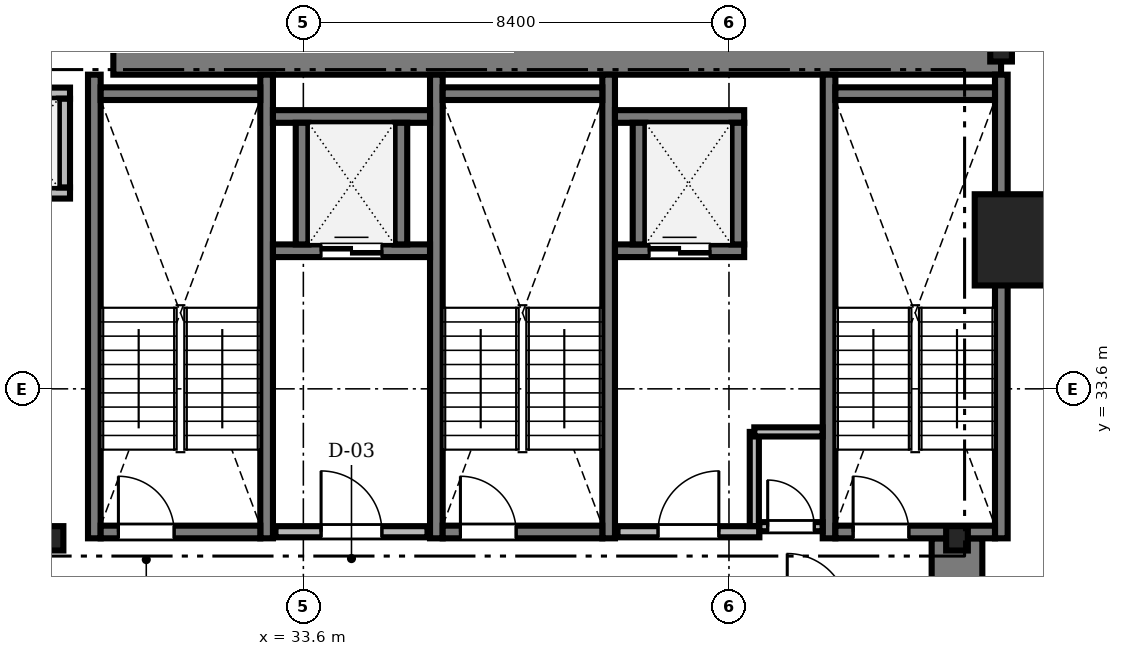
"""IFC4 building model, lengths in metres.
Left out: names, types, materials, properties, quantities, classifications, styles, units other than length and angle.
Written with IfcOpenShell. Run it as: python <this file> out.ifc"""

import sys

from ifc_helpers import new_model, si_unit, direction, frame, frame_2d, origin, origin_2d, place, context, subcontext, project, spatial, rectangle, i_section, extrude, source, transform, mapped, element, fill, save


model = new_model("IFC4")
c1 = context("Model", 3, precision=1e-05, world=origin(), true_north=direction((0.0, 1.0)))
c2 = subcontext(c1, "Body", "Model", "MODEL_VIEW")
j1 = project(units=[si_unit("LENGTHUNIT", "METRE"), si_unit("PLANEANGLEUNIT", "RADIAN")], contexts=[c1])
p1 = place(None, origin())
s1 = spatial("IfcSite", under=j1, at=p1, CompositionType="ELEMENT")
p2 = place(p1, origin())
s2 = spatial("IfcBuilding", under=s1, at=p2, CompositionType="ELEMENT")
p3 = place(p2, frame((0.0, 0.0, 56.8)))
s3 = spatial("IfcBuildingStorey", under=s2, at=p3, CompositionType="ELEMENT", Elevation=56.8)
m1 = source(origin(), c2, "Body", "SweptSolid", [
    extrude(rectangle(XDim=17.52, YDim=1.0, at=frame_2d((8.76, 0.0))), origin(), (0.0, 0.0, 1.0), 3.41),
])
p4 = place(p3, frame((29.85, 40.3, 0.0), z_axis=(0.0, 0.0, 1.0), x_axis=(1.0, 0.0, 0.0)))
e1 = element("IfcWall", 1, at=p4, inside=s3, PredefinedType="SHEAR", context=c2, shape_type="MappedRepresentation", body=[
    mapped(m1, transform((0.0, 0.0, 0.0), scale=1.0)),
])
m2 = source(origin(), c2, "Body", "SweptSolid", [
    extrude(rectangle(XDim=13.15, YDim=1.0, at=frame_2d((6.575, 0.0))), origin(), (0.0, 0.0, 1.0), 3.41),
])
p5 = place(p3, frame((46.5, 17.5, 0.0), z_axis=(0.0, 0.0, 1.0), x_axis=(0.0, 1.0, 0.0)))
e2 = element("IfcWall", 2, at=p5, inside=s3, PredefinedType="SHEAR", context=c2, shape_type="MappedRepresentation", body=[
    mapped(m2, transform((0.0, 0.0, 0.0), scale=1.0)),
])
m3 = source(origin(), c2, "Body", "SweptSolid", [
    extrude(i_section(OverallWidth=0.428, OverallDepth=0.481, WebThickness=0.04, FlangeThickness=0.063, FilletRadius=0.015, at=origin_2d()), origin(), (0.0, 0.0, 1.0), 3.41),
])
for number, where, z_axis, x_axis in (
    (3, (28.65, 30.65, 0.0), (0.0, 0.0, 1.0), (1.0, 0.0, 0.0)),
    (4, (46.5, 30.65, 0.0), (0.0, 0.0, 1.0), (1.0, 0.0, 0.0)),
    (5, (47.37, 40.3, 0.0), (0.0, 0.0, 1.0), (1.0, 0.0, 0.0)),
):
    element("IfcColumn", number, at=place(p3, frame(where, z_axis=z_axis, x_axis=x_axis)), inside=s3, PredefinedType="COLUMN", context=c2, shape_type="MappedRepresentation", body=[
        mapped(m3, transform((0.0, 0.0, 0.0), scale=1.0)),
    ])
m4 = source(origin(), c2, "Body", "SweptSolid", [
    extrude(rectangle(XDim=1.8, YDim=1.8, at=origin_2d()), origin(), (0.0, 0.0, 1.0), 3.41),
])
p6 = place(p3, frame((47.75, 36.54, 0.0), z_axis=(0.0, 0.0, 1.0), x_axis=(1.0, 0.0, 0.0)))
e6 = element("IfcColumn", 6, at=p6, inside=s3, PredefinedType="COLUMN", context=c2, shape_type="MappedRepresentation", body=[
    mapped(m4, transform((0.0, 0.0, 0.0), scale=1.0)),
])
m5 = source(origin(), c2, "Body", "SweptSolid", [
    extrude(rectangle(XDim=9.15, YDim=0.25, at=frame_2d((4.575, 0.0))), origin(), (0.0, 0.0, 1.0), 3.45),
])
for number, where, z_axis, x_axis in (
    (7, (29.475, 30.65, 0.0), (0.0, 0.0, 1.0), (0.0, 1.0, 0.0)),
    (8, (32.875, 30.65, 0.0), (0.0, 0.0, 1.0), (0.0, 1.0, 0.0)),
):
    element("IfcWall", number, at=place(p3, frame(where, z_axis=z_axis, x_axis=x_axis)), inside=s3, PredefinedType="SOLIDWALL", context=c2, shape_type="MappedRepresentation", body=[
        mapped(m5, transform((0.0, 0.0, 0.0), scale=1.0)),
    ])
m6 = source(origin(), c2, "Body", "SweptSolid", [
    extrude(rectangle(XDim=3.15, YDim=0.25, at=frame_2d((1.575, 0.0))), origin(), (0.0, 0.0, 1.0), 3.45),
])
p7 = place(p3, frame((29.6, 39.425, 0.0), z_axis=(0.0, 0.0, 1.0), x_axis=(1.0, 0.0, 0.0)))
e9 = element("IfcWall", 9, at=p7, inside=s3, PredefinedType="SOLIDWALL", context=c2, shape_type="MappedRepresentation", body=[
    mapped(m6, transform((0.0, 0.0, 0.0), scale=1.0)),
])
p8 = place(p3, frame((29.6, 30.775, 0.0), z_axis=(0.0, 0.0, 1.0), x_axis=(1.0, 0.0, 0.0)))
e10 = element("IfcWall", 10, at=p8, inside=s3, PredefinedType="SOLIDWALL", context=c2, shape_type="MappedRepresentation", body=[
    mapped(m6, transform((0.0, 0.0, 0.0), scale=1.0)),
])
m7 = source(origin(), c2, "Body", "SweptSolid", [
    extrude(rectangle(XDim=1.1, YDim=2.2, at=frame_2d((0.55, 1.1))), frame((0.0, 0.135, 0.0), z_axis=(0.0, -1.0, 0.0), x_axis=(1.0, 0.0, 0.0)), (0.0, 0.0, 1.0), 0.27),
])
p9 = place(p8, frame((0.35, 0.0, 0.0)))
e11 = element("IfcOpeningElement", 11, at=p9, cuts=e10, PredefinedType="OPENING", context=c2, shape_type="MappedRepresentation", body=[
    mapped(m7, transform((0.0, 0.0, 0.0), scale=1.0)),
])
for number, where, z_axis, x_axis in (
    (12, (36.225, 30.65, 0.0), (0.0, 0.0, 1.0), (0.0, 1.0, 0.0)),
    (13, (39.625, 30.65, 0.0), (0.0, 0.0, 1.0), (0.0, 1.0, 0.0)),
):
    element("IfcWall", number, at=place(p3, frame(where, z_axis=z_axis, x_axis=x_axis)), inside=s3, PredefinedType="SOLIDWALL", context=c2, shape_type="MappedRepresentation", body=[
        mapped(m5, transform((0.0, 0.0, 0.0), scale=1.0)),
    ])
p10 = place(p3, frame((36.35, 39.425, 0.0), z_axis=(0.0, 0.0, 1.0), x_axis=(1.0, 0.0, 0.0)))
e14 = element("IfcWall", 14, at=p10, inside=s3, PredefinedType="SOLIDWALL", context=c2, shape_type="MappedRepresentation", body=[
    mapped(m6, transform((0.0, 0.0, 0.0), scale=1.0)),
])
p11 = place(p3, frame((36.35, 30.775, 0.0), z_axis=(0.0, 0.0, 1.0), x_axis=(1.0, 0.0, 0.0)))
e15 = element("IfcWall", 15, at=p11, inside=s3, PredefinedType="SOLIDWALL", context=c2, shape_type="MappedRepresentation", body=[
    mapped(m6, transform((0.0, 0.0, 0.0), scale=1.0)),
])
p12 = place(p11, frame((0.35, 0.0, 0.0)))
e16 = element("IfcOpeningElement", 16, at=p12, cuts=e15, PredefinedType="OPENING", context=c2, shape_type="MappedRepresentation", body=[
    mapped(m7, transform((0.0, 0.0, 0.0), scale=1.0)),
])
for number, where, z_axis, x_axis in (
    (17, (43.975, 30.65, 0.0), (0.0, 0.0, 1.0), (0.0, 1.0, 0.0)),
    (18, (47.375, 30.65, 0.0), (0.0, 0.0, 1.0), (0.0, 1.0, 0.0)),
):
    element("IfcWall", number, at=place(p3, frame(where, z_axis=z_axis, x_axis=x_axis)), inside=s3, PredefinedType="SOLIDWALL", context=c2, shape_type="MappedRepresentation", body=[
        mapped(m5, transform((0.0, 0.0, 0.0), scale=1.0)),
    ])
p13 = place(p3, frame((44.1, 39.425, 0.0), z_axis=(0.0, 0.0, 1.0), x_axis=(1.0, 0.0, 0.0)))
e19 = element("IfcWall", 19, at=p13, inside=s3, PredefinedType="SOLIDWALL", context=c2, shape_type="MappedRepresentation", body=[
    mapped(m6, transform((0.0, 0.0, 0.0), scale=1.0)),
])
p14 = place(p3, frame((44.1, 30.775, 0.0), z_axis=(0.0, 0.0, 1.0), x_axis=(1.0, 0.0, 0.0)))
e20 = element("IfcWall", 20, at=p14, inside=s3, PredefinedType="SOLIDWALL", context=c2, shape_type="MappedRepresentation", body=[
    mapped(m6, transform((0.0, 0.0, 0.0), scale=1.0)),
])
p15 = place(p14, frame((0.35, 0.0, 0.0)))
e21 = element("IfcOpeningElement", 21, at=p15, cuts=e20, PredefinedType="OPENING", context=c2, shape_type="MappedRepresentation", body=[
    mapped(m7, transform((0.0, 0.0, 0.0), scale=1.0)),
])
m8 = source(origin(), c2, "Body", "SweptSolid", [
    extrude(rectangle(XDim=3.0, YDim=0.22, at=frame_2d((1.5, 0.0))), origin(), (0.0, 0.0, 1.0), 3.41),
])
p16 = place(p3, frame((33.05, 30.78, 0.0), z_axis=(0.0, 0.0, 1.0), x_axis=(1.0, 0.0, 0.0)))
e22 = element("IfcWall", 22, at=p16, inside=s3, PredefinedType="SOLIDWALL", context=c2, shape_type="MappedRepresentation", body=[
    mapped(m8, transform((0.0, 0.0, 0.0), scale=1.0)),
])
m9 = source(origin(), c2, "Body", "SweptSolid", [
    extrude(rectangle(XDim=1.2, YDim=2.2, at=frame_2d((0.6, 1.1))), frame((0.0, 0.12, 0.0), z_axis=(0.0, -1.0, 0.0), x_axis=(1.0, 0.0, 0.0)), (0.0, 0.0, 1.0), 0.24),
])
p17 = place(p16, frame((0.9, 0.0, 0.0)))
e23 = element("IfcOpeningElement", 23, at=p17, cuts=e22, PredefinedType="OPENING", context=c2, shape_type="MappedRepresentation", body=[
    mapped(m9, transform((0.0, 0.0, 0.0), scale=1.0)),
])
m10 = source(origin(), c2, "Body", "SweptSolid", [
    extrude(rectangle(XDim=2.8, YDim=0.22, at=frame_2d((1.4, 0.0))), origin(), (0.0, 0.0, 1.0), 3.41),
])
p18 = place(p3, frame((39.8, 30.78, 0.0), z_axis=(0.0, 0.0, 1.0), x_axis=(1.0, 0.0, 0.0)))
e24 = element("IfcWall", 24, at=p18, inside=s3, PredefinedType="SOLIDWALL", context=c2, shape_type="MappedRepresentation", body=[
    mapped(m10, transform((0.0, 0.0, 0.0), scale=1.0)),
])
p19 = place(p18, frame((0.8, 0.0, 0.0)))
e25 = element("IfcOpeningElement", 25, at=p19, cuts=e24, PredefinedType="OPENING", context=c2, shape_type="MappedRepresentation", body=[
    mapped(m9, transform((0.0, 0.0, 0.0), scale=1.0)),
])
m11 = source(origin(), c2, "Body", "SweptSolid", [
    extrude(rectangle(XDim=1.99, YDim=0.22, at=frame_2d((0.995, 0.0))), origin(), (0.0, 0.0, 1.0), 3.41),
])
p20 = place(p3, frame((27.005, 37.465, 0.0), z_axis=(0.0, 0.0, 1.0), x_axis=(1.0, 0.0, 0.0)))
e26 = element("IfcWall", 26, at=p20, inside=s3, PredefinedType="SOLIDWALL", context=c2, shape_type="MappedRepresentation", body=[
    mapped(m11, transform((0.0, 0.0, 0.0), scale=1.0)),
])
m12 = source(origin(), c2, "Body", "SweptSolid", [
    extrude(rectangle(XDim=1.1, YDim=2.2, at=frame_2d((0.55, 1.1))), frame((0.0, 0.12, 0.0), z_axis=(0.0, -1.0, 0.0), x_axis=(1.0, 0.0, 0.0)), (0.0, 0.0, 1.0), 0.24),
])
p21 = place(p20, frame((0.445, 0.0, 0.0)))
e27 = element("IfcOpeningElement", 27, at=p21, cuts=e26, PredefinedType="OPENING", context=c2, shape_type="MappedRepresentation", body=[
    mapped(m12, transform((0.0, 0.0, 0.0), scale=1.0)),
])
p22 = place(p3, frame((27.005, 39.435, 0.0), z_axis=(0.0, 0.0, 1.0), x_axis=(1.0, 0.0, 0.0)))
e28 = element("IfcWall", 28, at=p22, inside=s3, PredefinedType="SOLIDWALL", context=c2, shape_type="MappedRepresentation", body=[
    mapped(m11, transform((0.0, 0.0, 0.0), scale=1.0)),
])
m13 = source(origin(), c2, "Body", "SweptSolid", [
    extrude(rectangle(XDim=1.75, YDim=0.22, at=frame_2d((0.875, 0.0))), origin(), (0.0, 0.0, 1.0), 3.41),
])
p23 = place(p3, frame((28.885, 37.575, 0.0), z_axis=(0.0, 0.0, 1.0), x_axis=(0.0, 1.0, 0.0)))
e29 = element("IfcWall", 29, at=p23, inside=s3, PredefinedType="SOLIDWALL", context=c2, shape_type="MappedRepresentation", body=[
    mapped(m13, transform((0.0, 0.0, 0.0), scale=1.0)),
])
m14 = source(origin(), c2, "Body", "SweptSolid", [
    extrude(rectangle(XDim=3.1, YDim=0.25, at=frame_2d((1.55, 0.0))), origin(), (0.0, 0.0, 1.0), 3.41),
])
p24 = place(p3, frame((33.0, 36.325, 0.0), z_axis=(0.0, 0.0, 1.0), x_axis=(1.0, 0.0, 0.0)))
e30 = element("IfcWall", 30, at=p24, inside=s3, PredefinedType="SOLIDWALL", context=c2, shape_type="MappedRepresentation", body=[
    mapped(m14, transform((0.0, 0.0, 0.0), scale=1.0)),
])
m15 = source(origin(), c2, "Body", "SweptSolid", [
    extrude(rectangle(XDim=1.2, YDim=2.25, at=frame_2d((0.6, 1.125))), frame((0.0, 0.135, 0.0), z_axis=(0.0, -1.0, 0.0), x_axis=(1.0, 0.0, 0.0)), (0.0, 0.0, 1.0), 0.27),
])
p25 = place(p24, frame((0.95, 0.0, 0.0)))
e31 = element("IfcOpeningElement", 31, at=p25, cuts=e30, PredefinedType="OPENING", context=c2, shape_type="MappedRepresentation", body=[
    mapped(m15, transform((0.0, 0.0, 0.0), scale=1.0)),
])
p26 = place(p3, frame((33.0, 38.975, 0.0), z_axis=(0.0, 0.0, 1.0), x_axis=(1.0, 0.0, 0.0)))
e32 = element("IfcWall", 32, at=p26, inside=s3, PredefinedType="SOLIDWALL", context=c2, shape_type="MappedRepresentation", body=[
    mapped(m14, transform((0.0, 0.0, 0.0), scale=1.0)),
])
m16 = source(origin(), c2, "Body", "SweptSolid", [
    extrude(rectangle(XDim=2.4, YDim=0.25, at=frame_2d((1.2, 0.0))), origin(), (0.0, 0.0, 1.0), 3.41),
])
for number, where, z_axis, x_axis in (
    (33, (33.575, 36.45, 0.0), (0.0, 0.0, 1.0), (0.0, 1.0, 0.0)),
    (34, (35.525, 36.45, 0.0), (0.0, 0.0, 1.0), (0.0, 1.0, 0.0)),
):
    element("IfcWall", number, at=place(p3, frame(where, z_axis=z_axis, x_axis=x_axis)), inside=s3, PredefinedType="SOLIDWALL", context=c2, shape_type="MappedRepresentation", body=[
        mapped(m16, transform((0.0, 0.0, 0.0), scale=1.0)),
    ])
m17 = source(origin(), c2, "Body", "SweptSolid", [
    extrude(rectangle(XDim=2.55, YDim=0.25, at=frame_2d((1.275, 0.0))), origin(), (0.0, 0.0, 1.0), 3.41),
])
p27 = place(p3, frame((39.75, 36.325, 0.0), z_axis=(0.0, 0.0, 1.0), x_axis=(1.0, 0.0, 0.0)))
e35 = element("IfcWall", 35, at=p27, inside=s3, PredefinedType="SOLIDWALL", context=c2, shape_type="MappedRepresentation", body=[
    mapped(m17, transform((0.0, 0.0, 0.0), scale=1.0)),
])
p28 = place(p27, frame((0.675, 0.0, 0.0)))
e36 = element("IfcOpeningElement", 36, at=p28, cuts=e35, PredefinedType="OPENING", context=c2, shape_type="MappedRepresentation", body=[
    mapped(m15, transform((0.0, 0.0, 0.0), scale=1.0)),
])
p29 = place(p3, frame((39.75, 38.975, 0.0), z_axis=(0.0, 0.0, 1.0), x_axis=(1.0, 0.0, 0.0)))
e37 = element("IfcWall", 37, at=p29, inside=s3, PredefinedType="SOLIDWALL", context=c2, shape_type="MappedRepresentation", body=[
    mapped(m17, transform((0.0, 0.0, 0.0), scale=1.0)),
])
for number, where, z_axis, x_axis in (
    (38, (40.225, 36.45, 0.0), (0.0, 0.0, 1.0), (0.0, 1.0, 0.0)),
    (39, (42.175, 36.45, 0.0), (0.0, 0.0, 1.0), (0.0, 1.0, 0.0)),
):
    element("IfcWall", number, at=place(p3, frame(where, z_axis=z_axis, x_axis=x_axis)), inside=s3, PredefinedType="SOLIDWALL", context=c2, shape_type="MappedRepresentation", body=[
        mapped(m16, transform((0.0, 0.0, 0.0), scale=1.0)),
    ])
m18 = source(origin(), c2, "Body", "SweptSolid", [
    extrude(rectangle(XDim=1.248, YDim=0.18, at=frame_2d((0.624, 0.0))), origin(), (0.0, 0.0, 1.0), 3.41),
])
p30 = place(p3, frame((42.6, 30.88, 0.0), z_axis=(0.0, 0.0, 1.0), x_axis=(1.0, 0.0, 0.0)))
e40 = element("IfcWall", 40, at=p30, inside=s3, PredefinedType="PARTITIONING", context=c2, shape_type="MappedRepresentation", body=[
    mapped(m18, transform((0.0, 0.0, 0.0), scale=1.0)),
])
m19 = source(origin(), c2, "Body", "SweptSolid", [
    extrude(rectangle(XDim=0.92, YDim=2.1, at=frame_2d((0.46, 1.05))), frame((0.0, 0.1, 0.0), z_axis=(0.0, -1.0, 0.0), x_axis=(1.0, 0.0, 0.0)), (0.0, 0.0, 1.0), 0.2),
])
p31 = place(p30, frame((0.164, 0.0, 0.0)))
e41 = element("IfcOpeningElement", 41, at=p31, cuts=e40, PredefinedType="OPENING", context=c2, shape_type="MappedRepresentation", body=[
    mapped(m19, transform((0.0, 0.0, 0.0), scale=1.0)),
])
m20 = source(origin(), c2, "Body", "SweptSolid", [
    extrude(rectangle(XDim=1.858, YDim=0.18, at=frame_2d((0.929, 0.0))), origin(), (0.0, 0.0, 1.0), 3.41),
])
p32 = place(p3, frame((42.5, 30.892, 0.0), z_axis=(0.0, 0.0, 1.0), x_axis=(0.0, 1.0, 0.0)))
e42 = element("IfcWall", 42, at=p32, inside=s3, PredefinedType="PARTITIONING", context=c2, shape_type="MappedRepresentation", body=[
    mapped(m20, transform((0.0, 0.0, 0.0), scale=1.0)),
])
m21 = source(origin(), c2, "Body", "SweptSolid", [
    extrude(rectangle(XDim=1.348, YDim=0.18, at=frame_2d((0.674, 0.0))), origin(), (0.0, 0.0, 1.0), 3.41),
])
p33 = place(p3, frame((42.5, 32.75, 0.0), z_axis=(0.0, 0.0, 1.0), x_axis=(1.0, 0.0, 0.0)))
e43 = element("IfcWall", 43, at=p33, inside=s3, PredefinedType="PARTITIONING", context=c2, shape_type="MappedRepresentation", body=[
    mapped(m21, transform((0.0, 0.0, 0.0), scale=1.0)),
])
m22 = source(origin(), c2, "Body", "SweptSolid", [
    extrude(rectangle(XDim=1.1, YDim=2.2, at=frame_2d((0.55, 1.1))), frame((0.0, 0.025, 0.0), z_axis=(0.0, -1.0, 0.0), x_axis=(1.0, 0.0, 0.0)), (0.0, 0.0, 1.0), 0.05),
])
p34 = place(p9, origin())
e44 = element("IfcDoor", 44, at=p34, inside=s3, OperationType="SINGLE_SWING_LEFT", PredefinedType="DOOR", context=c2, shape_type="MappedRepresentation", body=[
    mapped(m22, transform((0.0, 0.0, 0.0), scale=1.0)),
])
fill(e11, e44)
p35 = place(p12, origin())
e45 = element("IfcDoor", 45, at=p35, inside=s3, OperationType="SINGLE_SWING_LEFT", PredefinedType="DOOR", context=c2, shape_type="MappedRepresentation", body=[
    mapped(m22, transform((0.0, 0.0, 0.0), scale=1.0)),
])
fill(e16, e45)
p36 = place(p15, origin())
e46 = element("IfcDoor", 46, at=p36, inside=s3, OperationType="SINGLE_SWING_LEFT", PredefinedType="DOOR", context=c2, shape_type="MappedRepresentation", body=[
    mapped(m22, transform((0.0, 0.0, 0.0), scale=1.0)),
])
fill(e21, e46)
m23 = source(origin(), c2, "Body", "SweptSolid", [
    extrude(rectangle(XDim=1.2, YDim=2.2, at=frame_2d((0.6, 1.1))), frame((0.0, 0.025, 0.0), z_axis=(0.0, -1.0, 0.0), x_axis=(1.0, 0.0, 0.0)), (0.0, 0.0, 1.0), 0.05),
])
p37 = place(p17, origin())
e47 = element("IfcDoor", 47, at=p37, inside=s3, OperationType="SINGLE_SWING_LEFT", PredefinedType="DOOR", context=c2, shape_type="MappedRepresentation", body=[
    mapped(m23, transform((0.0, 0.0, 0.0), scale=1.0)),
])
fill(e23, e47)
p38 = place(p19, origin())
e48 = element("IfcDoor", 48, at=p38, inside=s3, OperationType="SINGLE_SWING_RIGHT", PredefinedType="DOOR", context=c2, shape_type="MappedRepresentation", body=[
    mapped(m23, transform((0.0, 0.0, 0.0), scale=1.0)),
])
fill(e25, e48)
m24 = source(origin(), c2, "Body", "SweptSolid", [
    extrude(rectangle(XDim=1.2, YDim=2.25, at=frame_2d((0.6, 1.125))), frame((0.0, 0.025, 0.0), z_axis=(0.0, -1.0, 0.0), x_axis=(1.0, 0.0, 0.0)), (0.0, 0.0, 1.0), 0.05),
])
p39 = place(p25, origin())
e49 = element("IfcDoor", 49, at=p39, inside=s3, OperationType="DOUBLE_DOOR_SLIDING", PredefinedType="DOOR", context=c2, shape_type="MappedRepresentation", body=[
    mapped(m24, transform((0.0, 0.0, 0.0), scale=1.0)),
])
fill(e31, e49)
p40 = place(p28, origin())
e50 = element("IfcDoor", 50, at=p40, inside=s3, OperationType="DOUBLE_DOOR_SLIDING", PredefinedType="DOOR", context=c2, shape_type="MappedRepresentation", body=[
    mapped(m24, transform((0.0, 0.0, 0.0), scale=1.0)),
])
fill(e36, e50)
m25 = source(origin(), c2, "Body", "SweptSolid", [
    extrude(rectangle(XDim=0.92, YDim=2.1, at=frame_2d((0.46, 1.05))), frame((0.0, 0.025, 0.0), z_axis=(0.0, -1.0, 0.0), x_axis=(1.0, 0.0, 0.0)), (0.0, 0.0, 1.0), 0.05),
])
p41 = place(p31, origin())
e51 = element("IfcDoor", 51, at=p41, inside=s3, OperationType="SINGLE_SWING_LEFT", PredefinedType="DOOR", context=c2, shape_type="MappedRepresentation", body=[
    mapped(m25, transform((0.0, 0.0, 0.0), scale=1.0)),
])
fill(e41, e51)
save(model, sys.argv[1])
